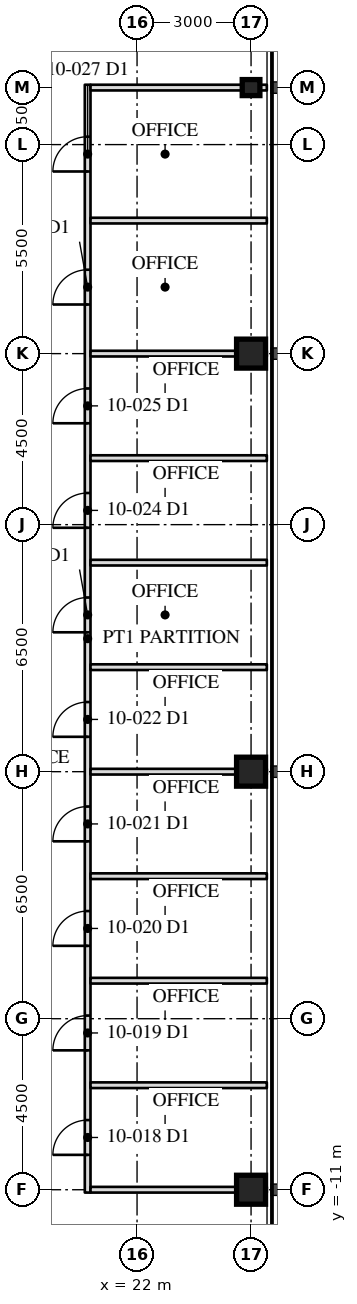
"""IFC4 building model, lengths in metres.
Left out: names, types, materials, properties, quantities, classifications, styles, units other than length and angle.
Written with IfcOpenShell. Run it as: python <this file> out.ifc"""

import sys

from ifc_helpers import new_model, si_unit, direction, frame, frame_2d, origin, origin_2d, place, context, subcontext, project, spatial, rectangle, hollow_rectangle, i_section, extrude, element, fill, save


model = new_model("IFC4")
c1 = context("Model", 3, precision=1e-05, world=origin(), true_north=direction((0.0, 1.0)))
c2 = subcontext(c1, "Body", "Model", "MODEL_VIEW")
j1 = project(units=[si_unit("LENGTHUNIT", "METRE"), si_unit("PLANEANGLEUNIT", "RADIAN")], contexts=[c1])
p1 = place(None, origin())
s1 = spatial("IfcSite", under=j1, at=p1, CompositionType="ELEMENT")
p2 = place(p1, origin())
s2 = spatial("IfcBuilding", under=s1, at=p2, CompositionType="ELEMENT")
p3 = place(p2, frame((0.0, 0.0, 44.7)))
s3 = spatial("IfcBuildingStorey", under=s2, at=p3, CompositionType="ELEMENT", Elevation=44.7)
for number, where, z_axis, x_axis in (
    (1, (25.0, -11.0, 0.0), (0.0, 0.0, 1.0), (0.0, 1.0, 0.0)),
    (2, (25.0, 0.0, 0.0), (0.0, 0.0, 1.0), (0.0, 1.0, 0.0)),
    (3, (25.0, 11.0, 0.0), (0.0, 0.0, 1.0), (0.0, 1.0, 0.0)),
):
    element("IfcColumn", number, at=place(p3, frame(where, z_axis=z_axis, x_axis=x_axis)), inside=s3, PredefinedType="COLUMN", context=c2, shape_type="SweptSolid", body=[
        extrude(hollow_rectangle(XDim=0.762, YDim=0.762, WallThickness=0.127, at=origin_2d()), origin(), (0.0, 0.0, 1.0), 4.1),
    ])
p4 = place(p3, frame((25.0, 18.0, 0.0), z_axis=(0.0, 0.0, 1.0), x_axis=(0.0, 1.0, 0.0)))
e4 = element("IfcColumn", 4, at=p4, inside=s3, PredefinedType="COLUMN", context=c2, shape_type="SweptSolid", body=[
    extrude(i_section(OverallWidth=0.422, OverallDepth=0.465, WebThickness=0.045, FlangeThickness=0.073, at=origin_2d()), origin(), (0.0, 0.0, 1.0), 4.1),
])
p5 = place(p3, frame((20.7, -11.075, 0.0), z_axis=(0.0, 0.0, 1.0), x_axis=(0.0, 1.0, 0.0)))
e5 = element("IfcWall", 5, at=p5, inside=s3, PredefinedType="PARTITIONING", context=c2, shape_type="SweptSolid", body=[
    extrude(rectangle(XDim=29.15, YDim=0.15, at=frame_2d((14.575, 0.0))), origin(), (0.0, 0.0, 1.0), 3.91),
])
p6 = place(p5, frame((0.992, 0.0, 0.0)))
e6 = element("IfcOpeningElement", 6, at=p6, cuts=e5, PredefinedType="OPENING", context=c2, shape_type="SweptSolid", body=[
    extrude(rectangle(XDim=0.915, YDim=2.134, at=frame_2d((0.458, 1.067))), frame((0.0, 0.085, 0.0), z_axis=(0.0, -1.0, 0.0), x_axis=(1.0, 0.0, 0.0)), (0.0, 0.0, 1.0), 0.17),
])
p7 = place(p5, frame((3.742, 0.0, 0.0)))
e7 = element("IfcOpeningElement", 7, at=p7, cuts=e5, PredefinedType="OPENING", context=c2, shape_type="SweptSolid", body=[
    extrude(rectangle(XDim=0.915, YDim=2.134, at=frame_2d((0.458, 1.067))), frame((0.0, 0.085, 0.0), z_axis=(0.0, -1.0, 0.0), x_axis=(1.0, 0.0, 0.0)), (0.0, 0.0, 1.0), 0.17),
])
p8 = place(p5, frame((6.492, 0.0, 0.0)))
e8 = element("IfcOpeningElement", 8, at=p8, cuts=e5, PredefinedType="OPENING", context=c2, shape_type="SweptSolid", body=[
    extrude(rectangle(XDim=0.915, YDim=2.134, at=frame_2d((0.458, 1.067))), frame((0.0, 0.085, 0.0), z_axis=(0.0, -1.0, 0.0), x_axis=(1.0, 0.0, 0.0)), (0.0, 0.0, 1.0), 0.17),
])
p9 = place(p5, frame((9.242, 0.0, 0.0)))
e9 = element("IfcOpeningElement", 9, at=p9, cuts=e5, PredefinedType="OPENING", context=c2, shape_type="SweptSolid", body=[
    extrude(rectangle(XDim=0.915, YDim=2.134, at=frame_2d((0.458, 1.067))), frame((0.0, 0.085, 0.0), z_axis=(0.0, -1.0, 0.0), x_axis=(1.0, 0.0, 0.0)), (0.0, 0.0, 1.0), 0.17),
])
p10 = place(p5, frame((11.992, 0.0, 0.0)))
e10 = element("IfcOpeningElement", 10, at=p10, cuts=e5, PredefinedType="OPENING", context=c2, shape_type="SweptSolid", body=[
    extrude(rectangle(XDim=0.915, YDim=2.134, at=frame_2d((0.458, 1.067))), frame((0.0, 0.085, 0.0), z_axis=(0.0, -1.0, 0.0), x_axis=(1.0, 0.0, 0.0)), (0.0, 0.0, 1.0), 0.17),
])
p11 = place(p5, frame((14.742, 0.0, 0.0)))
e11 = element("IfcOpeningElement", 11, at=p11, cuts=e5, PredefinedType="OPENING", context=c2, shape_type="SweptSolid", body=[
    extrude(rectangle(XDim=0.915, YDim=2.134, at=frame_2d((0.458, 1.067))), frame((0.0, 0.085, 0.0), z_axis=(0.0, -1.0, 0.0), x_axis=(1.0, 0.0, 0.0)), (0.0, 0.0, 1.0), 0.17),
])
p12 = place(p5, frame((17.492, 0.0, 0.0)))
e12 = element("IfcOpeningElement", 12, at=p12, cuts=e5, PredefinedType="OPENING", context=c2, shape_type="SweptSolid", body=[
    extrude(rectangle(XDim=0.915, YDim=2.134, at=frame_2d((0.458, 1.067))), frame((0.0, 0.085, 0.0), z_axis=(0.0, -1.0, 0.0), x_axis=(1.0, 0.0, 0.0)), (0.0, 0.0, 1.0), 0.17),
])
p13 = place(p5, frame((20.242, 0.0, 0.0)))
e13 = element("IfcOpeningElement", 13, at=p13, cuts=e5, PredefinedType="OPENING", context=c2, shape_type="SweptSolid", body=[
    extrude(rectangle(XDim=0.915, YDim=2.134, at=frame_2d((0.458, 1.067))), frame((0.0, 0.085, 0.0), z_axis=(0.0, -1.0, 0.0), x_axis=(1.0, 0.0, 0.0)), (0.0, 0.0, 1.0), 0.17),
])
p14 = place(p5, frame((23.367, 0.0, 0.0)))
e14 = element("IfcOpeningElement", 14, at=p14, cuts=e5, PredefinedType="OPENING", context=c2, shape_type="SweptSolid", body=[
    extrude(rectangle(XDim=0.915, YDim=2.134, at=frame_2d((0.458, 1.067))), frame((0.0, 0.085, 0.0), z_axis=(0.0, -1.0, 0.0), x_axis=(1.0, 0.0, 0.0)), (0.0, 0.0, 1.0), 0.17),
])
p15 = place(p5, frame((26.867, 0.0, 0.0)))
e15 = element("IfcOpeningElement", 15, at=p15, cuts=e5, PredefinedType="OPENING", context=c2, shape_type="SweptSolid", body=[
    extrude(rectangle(XDim=0.915, YDim=2.134, at=frame_2d((0.458, 1.067))), frame((0.0, 0.085, 0.0), z_axis=(0.0, -1.0, 0.0), x_axis=(1.0, 0.0, 0.0)), (0.0, 0.0, 1.0), 0.17),
])
p16 = place(p3, frame((20.775, -11.0, 0.0), z_axis=(0.0, 0.0, 1.0), x_axis=(1.0, 0.0, 0.0)))
e16 = element("IfcWall", 16, at=p16, inside=s3, PredefinedType="PARTITIONING", context=c2, shape_type="SweptSolid", body=[
    extrude(rectangle(XDim=4.64, YDim=0.15, at=frame_2d((2.32, 0.0))), origin(), (0.0, 0.0, 1.0), 3.13),
])
for number, where, z_axis, x_axis in (
    (17, (20.775, -8.25, 0.0), (0.0, 0.0, 1.0), (1.0, 0.0, 0.0)),
    (18, (20.775, -5.5, 0.0), (0.0, 0.0, 1.0), (1.0, 0.0, 0.0)),
    (19, (20.775, -2.75, 0.0), (0.0, 0.0, 1.0), (1.0, 0.0, 0.0)),
):
    element("IfcWall", number, at=place(p3, frame(where, z_axis=z_axis, x_axis=x_axis)), inside=s3, PredefinedType="PARTITIONING", context=c2, shape_type="SweptSolid", body=[
        extrude(rectangle(XDim=4.64, YDim=0.15, at=frame_2d((2.32, 0.0))), origin(), (0.0, 0.0, 1.0), 3.91),
    ])
p17 = place(p3, frame((20.775, 0.0, 0.0), z_axis=(0.0, 0.0, 1.0), x_axis=(1.0, 0.0, 0.0)))
e20 = element("IfcWall", 20, at=p17, inside=s3, PredefinedType="PARTITIONING", context=c2, shape_type="SweptSolid", body=[
    extrude(rectangle(XDim=4.64, YDim=0.15, at=frame_2d((2.32, 0.0))), origin(), (0.0, 0.0, 1.0), 3.13),
])
for number, where, z_axis, x_axis in (
    (21, (20.775, 2.75, 0.0), (0.0, 0.0, 1.0), (1.0, 0.0, 0.0)),
    (22, (20.775, 5.5, 0.0), (0.0, 0.0, 1.0), (1.0, 0.0, 0.0)),
    (23, (20.775, 8.25, 0.0), (0.0, 0.0, 1.0), (1.0, 0.0, 0.0)),
):
    element("IfcWall", number, at=place(p3, frame(where, z_axis=z_axis, x_axis=x_axis)), inside=s3, PredefinedType="PARTITIONING", context=c2, shape_type="SweptSolid", body=[
        extrude(rectangle(XDim=4.64, YDim=0.15, at=frame_2d((2.32, 0.0))), origin(), (0.0, 0.0, 1.0), 3.91),
    ])
p18 = place(p3, frame((20.775, 11.0, 0.0), z_axis=(0.0, 0.0, 1.0), x_axis=(1.0, 0.0, 0.0)))
e24 = element("IfcWall", 24, at=p18, inside=s3, PredefinedType="PARTITIONING", context=c2, shape_type="SweptSolid", body=[
    extrude(rectangle(XDim=4.64, YDim=0.15, at=frame_2d((2.32, 0.0))), origin(), (0.0, 0.0, 1.0), 3.13),
])
for number, where, z_axis, x_axis in (
    (25, (20.775, 14.5, 0.0), (0.0, 0.0, 1.0), (1.0, 0.0, 0.0)),
    (26, (20.775, 18.0, 0.0), (0.0, 0.0, 1.0), (1.0, 0.0, 0.0)),
):
    element("IfcWall", number, at=place(p3, frame(where, z_axis=z_axis, x_axis=x_axis)), inside=s3, PredefinedType="PARTITIONING", context=c2, shape_type="SweptSolid", body=[
        extrude(rectangle(XDim=4.64, YDim=0.15, at=frame_2d((2.32, 0.0))), origin(), (0.0, 0.0, 1.0), 3.91),
    ])
p19 = place(p6, origin())
e27 = element("IfcDoor", 27, at=p19, inside=s3, OperationType="SINGLE_SWING_LEFT", PredefinedType="DOOR", context=c2, shape_type="SweptSolid", body=[
    extrude(rectangle(XDim=0.915, YDim=2.134, at=frame_2d((0.458, 1.067))), frame((0.0, 0.025, 0.0), z_axis=(0.0, -1.0, 0.0), x_axis=(1.0, 0.0, 0.0)), (0.0, 0.0, 1.0), 0.05),
])
fill(e6, e27)
p20 = place(p7, origin())
e28 = element("IfcDoor", 28, at=p20, inside=s3, OperationType="SINGLE_SWING_LEFT", PredefinedType="DOOR", context=c2, shape_type="SweptSolid", body=[
    extrude(rectangle(XDim=0.915, YDim=2.134, at=frame_2d((0.458, 1.067))), frame((0.0, 0.025, 0.0), z_axis=(0.0, -1.0, 0.0), x_axis=(1.0, 0.0, 0.0)), (0.0, 0.0, 1.0), 0.05),
])
fill(e7, e28)
p21 = place(p8, origin())
e29 = element("IfcDoor", 29, at=p21, inside=s3, OperationType="SINGLE_SWING_LEFT", PredefinedType="DOOR", context=c2, shape_type="SweptSolid", body=[
    extrude(rectangle(XDim=0.915, YDim=2.134, at=frame_2d((0.458, 1.067))), frame((0.0, 0.025, 0.0), z_axis=(0.0, -1.0, 0.0), x_axis=(1.0, 0.0, 0.0)), (0.0, 0.0, 1.0), 0.05),
])
fill(e8, e29)
p22 = place(p9, origin())
e30 = element("IfcDoor", 30, at=p22, inside=s3, OperationType="SINGLE_SWING_LEFT", PredefinedType="DOOR", context=c2, shape_type="SweptSolid", body=[
    extrude(rectangle(XDim=0.915, YDim=2.134, at=frame_2d((0.458, 1.067))), frame((0.0, 0.025, 0.0), z_axis=(0.0, -1.0, 0.0), x_axis=(1.0, 0.0, 0.0)), (0.0, 0.0, 1.0), 0.05),
])
fill(e9, e30)
p23 = place(p10, origin())
e31 = element("IfcDoor", 31, at=p23, inside=s3, OperationType="SINGLE_SWING_LEFT", PredefinedType="DOOR", context=c2, shape_type="SweptSolid", body=[
    extrude(rectangle(XDim=0.915, YDim=2.134, at=frame_2d((0.458, 1.067))), frame((0.0, 0.025, 0.0), z_axis=(0.0, -1.0, 0.0), x_axis=(1.0, 0.0, 0.0)), (0.0, 0.0, 1.0), 0.05),
])
fill(e10, e31)
p24 = place(p11, origin())
e32 = element("IfcDoor", 32, at=p24, inside=s3, OperationType="SINGLE_SWING_LEFT", PredefinedType="DOOR", context=c2, shape_type="SweptSolid", body=[
    extrude(rectangle(XDim=0.915, YDim=2.134, at=frame_2d((0.458, 1.067))), frame((0.0, 0.025, 0.0), z_axis=(0.0, -1.0, 0.0), x_axis=(1.0, 0.0, 0.0)), (0.0, 0.0, 1.0), 0.05),
])
fill(e11, e32)
p25 = place(p12, origin())
e33 = element("IfcDoor", 33, at=p25, inside=s3, OperationType="SINGLE_SWING_LEFT", PredefinedType="DOOR", context=c2, shape_type="SweptSolid", body=[
    extrude(rectangle(XDim=0.915, YDim=2.134, at=frame_2d((0.458, 1.067))), frame((0.0, 0.025, 0.0), z_axis=(0.0, -1.0, 0.0), x_axis=(1.0, 0.0, 0.0)), (0.0, 0.0, 1.0), 0.05),
])
fill(e12, e33)
p26 = place(p13, origin())
e34 = element("IfcDoor", 34, at=p26, inside=s3, OperationType="SINGLE_SWING_LEFT", PredefinedType="DOOR", context=c2, shape_type="SweptSolid", body=[
    extrude(rectangle(XDim=0.915, YDim=2.134, at=frame_2d((0.458, 1.067))), frame((0.0, 0.025, 0.0), z_axis=(0.0, -1.0, 0.0), x_axis=(1.0, 0.0, 0.0)), (0.0, 0.0, 1.0), 0.05),
])
fill(e13, e34)
p27 = place(p14, origin())
e35 = element("IfcDoor", 35, at=p27, inside=s3, OperationType="SINGLE_SWING_LEFT", PredefinedType="DOOR", context=c2, shape_type="SweptSolid", body=[
    extrude(rectangle(XDim=0.915, YDim=2.134, at=frame_2d((0.458, 1.067))), frame((0.0, 0.025, 0.0), z_axis=(0.0, -1.0, 0.0), x_axis=(1.0, 0.0, 0.0)), (0.0, 0.0, 1.0), 0.05),
])
fill(e14, e35)
p28 = place(p15, origin())
e36 = element("IfcDoor", 36, at=p28, inside=s3, OperationType="SINGLE_SWING_LEFT", PredefinedType="DOOR", context=c2, shape_type="SweptSolid", body=[
    extrude(rectangle(XDim=0.915, YDim=2.134, at=frame_2d((0.458, 1.067))), frame((0.0, 0.025, 0.0), z_axis=(0.0, -1.0, 0.0), x_axis=(1.0, 0.0, 0.0)), (0.0, 0.0, 1.0), 0.05),
])
fill(e15, e36)
save(model, sys.argv[1])
